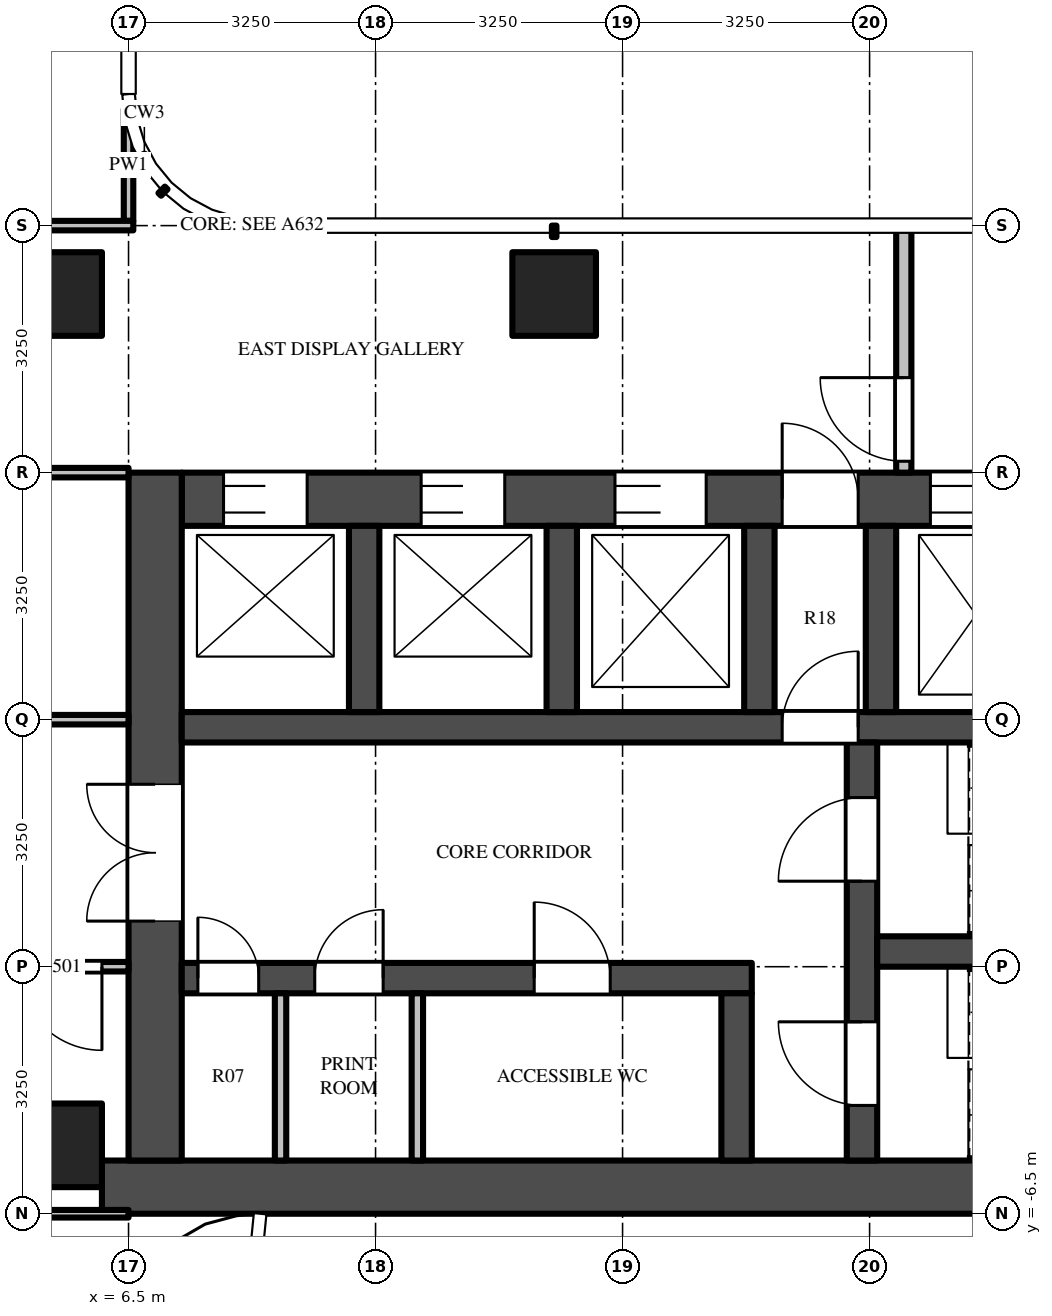
"""IFC4 building model, lengths in metres.
Left out: names, types, materials, properties, quantities, classifications, styles, units other than length and angle.
Written with IfcOpenShell. Run it as: python <this file> out.ifc"""

import sys

from ifc_helpers import new_model, si_unit, direction, frame, frame_2d, origin, origin_2d, place, context, subcontext, project, spatial, rectangle, extrude, source, transform, mapped, element, fill, save


model = new_model("IFC4")
c1 = context("Model", 3, precision=1e-05, world=origin(), true_north=direction((0.0, 1.0)))
c2 = subcontext(c1, "Body", "Model", "MODEL_VIEW")
j1 = project(units=[si_unit("LENGTHUNIT", "METRE"), si_unit("PLANEANGLEUNIT", "RADIAN")], contexts=[c1])
p1 = place(None, origin())
s1 = spatial("IfcSite", under=j1, at=p1, CompositionType="ELEMENT")
p2 = place(p1, origin())
s2 = spatial("IfcBuilding", under=s1, at=p2, CompositionType="ELEMENT")
p3 = place(p2, frame((0.0, 0.0, 251.9)))
s3 = spatial("IfcBuildingStorey", under=s2, at=p3, CompositionType="ELEMENT", Elevation=251.9)
m1 = source(origin(), c2, "Body", "SweptSolid", [
    extrude(rectangle(XDim=1.1, YDim=1.1, at=origin_2d()), origin(), (0.0, 0.0, 1.0), 3.9),
])
for number, where, z_axis, x_axis in (
    (1, (12.1, 5.6, 0.0), (0.0, 0.0, 1.0), (1.0, 0.0, 0.0)),
    (2, (5.6, 5.6, 0.0), (0.0, 0.0, 1.0), (1.0, 0.0, 0.0)),
    (3, (5.6, -5.6, 0.0), (0.0, 0.0, 1.0), (1.0, 0.0, 0.0)),
):
    element("IfcColumn", number, at=place(p3, frame(where, z_axis=z_axis, x_axis=x_axis)), inside=s3, PredefinedType="COLUMN", context=c2, shape_type="MappedRepresentation", body=[
        mapped(m1, transform((0.0, 0.0, 0.0))),
    ])
m2 = source(origin(), c2, "Body", "SweptSolid", [
    extrude(rectangle(XDim=16.6, YDim=0.7, at=frame_2d((8.3, 0.0))), origin(), (0.0, 0.0, 1.0), 3.7),
])
p4 = place(p3, frame((6.15, -6.15, 0.0), z_axis=(0.0, 0.0, 1.0), x_axis=(1.0, 0.0, 0.0)))
e4 = element("IfcWall", 4, at=p4, inside=s3, PredefinedType="SHEAR", context=c2, shape_type="MappedRepresentation", body=[
    mapped(m2, transform((0.0, 0.0, 0.0))),
])
m3 = source(origin(), c2, "Body", "SweptSolid", [
    extrude(rectangle(XDim=14.85, YDim=0.7, at=frame_2d((7.425, 0.0))), origin(), (0.0, 0.0, 1.0), 3.7),
])
p5 = place(p3, frame((7.2, 2.9, 0.0), z_axis=(0.0, 0.0, 1.0), x_axis=(1.0, 0.0, 0.0)))
e5 = element("IfcWall", 5, at=p5, inside=s3, PredefinedType="SHEAR", context=c2, shape_type="MappedRepresentation", body=[
    mapped(m3, transform((0.0, 0.0, 0.0))),
])
m4 = source(origin(), c2, "Body", "SweptSolid", [
    extrude(rectangle(XDim=1.1, YDim=2.1, at=frame_2d((0.55, 1.05))), frame((0.0, 0.36, 0.0), z_axis=(0.0, -1.0, 0.0), x_axis=(1.0, 0.0, 0.0)), (0.0, 0.0, 1.0), 0.72),
])
p6 = place(p5, frame((0.55, 0.0, 0.0)))
e6 = element("IfcOpeningElement", 6, at=p6, cuts=e5, PredefinedType="OPENING", context=c2, shape_type="MappedRepresentation", body=[
    mapped(m4, transform((0.0, 0.0, 0.0))),
])
p7 = place(p5, frame((3.15, 0.0, 0.0)))
e7 = element("IfcOpeningElement", 7, at=p7, cuts=e5, PredefinedType="OPENING", context=c2, shape_type="MappedRepresentation", body=[
    mapped(m4, transform((0.0, 0.0, 0.0))),
])
m5 = source(origin(), c2, "Body", "SweptSolid", [
    extrude(rectangle(XDim=1.2, YDim=2.1, at=frame_2d((0.6, 1.05))), frame((0.0, 0.36, 0.0), z_axis=(0.0, -1.0, 0.0), x_axis=(1.0, 0.0, 0.0)), (0.0, 0.0, 1.0), 0.72),
])
p8 = place(p5, frame((5.7, 0.0, 0.0)))
e8 = element("IfcOpeningElement", 8, at=p8, cuts=e5, PredefinedType="OPENING", context=c2, shape_type="MappedRepresentation", body=[
    mapped(m5, transform((0.0, 0.0, 0.0))),
])
m6 = source(origin(), c2, "Body", "SweptSolid", [
    extrude(rectangle(XDim=1.3, YDim=2.1, at=frame_2d((0.65, 1.05))), frame((0.0, 0.36, 0.0), z_axis=(0.0, -1.0, 0.0), x_axis=(1.0, 0.0, 0.0)), (0.0, 0.0, 1.0), 0.72),
])
p9 = place(p5, frame((12.2, 0.0, 0.0)))
e9 = element("IfcOpeningElement", 9, at=p9, cuts=e5, PredefinedType="OPENING", context=c2, shape_type="MappedRepresentation", body=[
    mapped(m6, transform((0.0, 0.0, 0.0))),
])
p10 = place(p5, frame((9.85, 0.0, 0.0)))
e10 = element("IfcOpeningElement", 10, at=p10, cuts=e5, PredefinedType="OPENING", context=c2, shape_type="MappedRepresentation", body=[
    mapped(m5, transform((0.0, 0.0, 0.0))),
])
m7 = source(origin(), c2, "Body", "SweptSolid", [
    extrude(rectangle(XDim=1.0, YDim=2.1, at=frame_2d((0.5, 1.05))), frame((0.0, 0.36, 0.0), z_axis=(0.0, -1.0, 0.0), x_axis=(1.0, 0.0, 0.0)), (0.0, 0.0, 1.0), 0.72),
])
p11 = place(p5, frame((7.9, 0.0, 0.0)))
e11 = element("IfcOpeningElement", 11, at=p11, cuts=e5, PredefinedType="OPENING", context=c2, shape_type="MappedRepresentation", body=[
    mapped(m7, transform((0.0, 0.0, 0.0))),
])
m8 = source(origin(), c2, "Body", "SweptSolid", [
    extrude(rectangle(XDim=9.05, YDim=0.7, at=frame_2d((4.525, 0.0))), origin(), (0.0, 0.0, 1.0), 3.7),
])
p12 = place(p3, frame((6.85, -5.8, 0.0), z_axis=(0.0, 0.0, 1.0), x_axis=(0.0, 1.0, 0.0)))
e12 = element("IfcWall", 12, at=p12, inside=s3, PredefinedType="SHEAR", context=c2, shape_type="MappedRepresentation", body=[
    mapped(m8, transform((0.0, 0.0, 0.0))),
])
m9 = source(origin(), c2, "Body", "SweptSolid", [
    extrude(rectangle(XDim=1.8, YDim=2.1, at=frame_2d((0.9, 1.05))), frame((0.0, 0.36, 0.0), z_axis=(0.0, -1.0, 0.0), x_axis=(1.0, 0.0, 0.0)), (0.0, 0.0, 1.0), 0.72),
])
p13 = place(p12, frame((3.15, 0.0, 0.0)))
e13 = element("IfcOpeningElement", 13, at=p13, cuts=e12, PredefinedType="OPENING", context=c2, shape_type="MappedRepresentation", body=[
    mapped(m9, transform((0.0, 0.0, 0.0))),
])
m10 = source(origin(), c2, "Body", "SweptSolid", [
    extrude(rectangle(XDim=7.5, YDim=0.4, at=frame_2d((3.75, 0.0))), origin(), (0.0, 0.0, 1.0), 3.7),
])
p14 = place(p3, frame((7.2, -3.4, 0.0), z_axis=(0.0, 0.0, 1.0), x_axis=(1.0, 0.0, 0.0)))
e14 = element("IfcWall", 14, at=p14, inside=s3, PredefinedType="SHEAR", context=c2, shape_type="MappedRepresentation", body=[
    mapped(m10, transform((0.0, 0.0, 0.0))),
])
m11 = source(origin(), c2, "Body", "SweptSolid", [
    extrude(rectangle(XDim=0.8, YDim=2.1, at=frame_2d((0.4, 1.05))), frame((0.0, 0.21, 0.0), z_axis=(0.0, -1.0, 0.0), x_axis=(1.0, 0.0, 0.0)), (0.0, 0.0, 1.0), 0.42),
])
p15 = place(p14, frame((0.212, 0.0, 0.0)))
e15 = element("IfcOpeningElement", 15, at=p15, cuts=e14, PredefinedType="OPENING", context=c2, shape_type="MappedRepresentation", body=[
    mapped(m11, transform((0.0, 0.0, 0.0))),
])
m12 = source(origin(), c2, "Body", "SweptSolid", [
    extrude(rectangle(XDim=0.9, YDim=2.1, at=frame_2d((0.45, 1.05))), frame((0.0, 0.21, 0.0), z_axis=(0.0, -1.0, 0.0), x_axis=(1.0, 0.0, 0.0)), (0.0, 0.0, 1.0), 0.42),
])
p16 = place(p14, frame((1.75, 0.0, 0.0)))
e16 = element("IfcOpeningElement", 16, at=p16, cuts=e14, PredefinedType="OPENING", context=c2, shape_type="MappedRepresentation", body=[
    mapped(m12, transform((0.0, 0.0, 0.0))),
])
m13 = source(origin(), c2, "Body", "SweptSolid", [
    extrude(rectangle(XDim=1.0, YDim=2.1, at=frame_2d((0.5, 1.05))), frame((0.0, 0.21, 0.0), z_axis=(0.0, -1.0, 0.0), x_axis=(1.0, 0.0, 0.0)), (0.0, 0.0, 1.0), 0.42),
])
p17 = place(p14, frame((4.637, 0.0, 0.0)))
e17 = element("IfcOpeningElement", 17, at=p17, cuts=e14, PredefinedType="OPENING", context=c2, shape_type="MappedRepresentation", body=[
    mapped(m13, transform((0.0, 0.0, 0.0))),
])
m14 = source(origin(), c2, "Body", "SweptSolid", [
    extrude(rectangle(XDim=14.85, YDim=0.4, at=frame_2d((7.425, 0.0))), origin(), (0.0, 0.0, 1.0), 3.7),
])
p18 = place(p3, frame((7.2, -0.1, 0.0), z_axis=(0.0, 0.0, 1.0), x_axis=(1.0, 0.0, 0.0)))
e18 = element("IfcWall", 18, at=p18, inside=s3, PredefinedType="SHEAR", context=c2, shape_type="MappedRepresentation", body=[
    mapped(m14, transform((0.0, 0.0, 0.0))),
])
p19 = place(p18, frame((7.9, 0.0, 0.0)))
e19 = element("IfcOpeningElement", 19, at=p19, cuts=e18, PredefinedType="OPENING", context=c2, shape_type="MappedRepresentation", body=[
    mapped(m13, transform((0.0, 0.0, 0.0))),
])
m15 = source(origin(), c2, "Body", "SweptSolid", [
    extrude(rectangle(XDim=5.5, YDim=0.4, at=frame_2d((2.75, 0.0))), origin(), (0.0, 0.0, 1.0), 3.7),
])
p20 = place(p3, frame((16.15, -5.8, 0.0), z_axis=(0.0, 0.0, 1.0), x_axis=(0.0, 1.0, 0.0)))
e20 = element("IfcWall", 20, at=p20, inside=s3, PredefinedType="SHEAR", context=c2, shape_type="MappedRepresentation", body=[
    mapped(m15, transform((0.0, 0.0, 0.0))),
])
m16 = source(origin(), c2, "Body", "SweptSolid", [
    extrude(rectangle(XDim=1.1, YDim=2.1, at=frame_2d((0.55, 1.05))), frame((0.0, 0.21, 0.0), z_axis=(0.0, -1.0, 0.0), x_axis=(1.0, 0.0, 0.0)), (0.0, 0.0, 1.0), 0.42),
])
p21 = place(p20, frame((0.725, 0.0, 0.0)))
e21 = element("IfcOpeningElement", 21, at=p21, cuts=e20, PredefinedType="OPENING", context=c2, shape_type="MappedRepresentation", body=[
    mapped(m16, transform((0.0, 0.0, 0.0))),
])
p22 = place(p20, frame((3.675, 0.0, 0.0)))
e22 = element("IfcOpeningElement", 22, at=p22, cuts=e20, PredefinedType="OPENING", context=c2, shape_type="MappedRepresentation", body=[
    mapped(m16, transform((0.0, 0.0, 0.0))),
])
m17 = source(origin(), c2, "Body", "SweptSolid", [
    extrude(rectangle(XDim=5.7, YDim=0.4, at=frame_2d((2.85, 0.0))), origin(), (0.0, 0.0, 1.0), 3.7),
])
p23 = place(p3, frame((16.35, -3.05, 0.0), z_axis=(0.0, 0.0, 1.0), x_axis=(1.0, 0.0, 0.0)))
e23 = element("IfcWall", 23, at=p23, inside=s3, PredefinedType="SHEAR", context=c2, shape_type="MappedRepresentation", body=[
    mapped(m17, transform((0.0, 0.0, 0.0))),
])
m18 = source(origin(), c2, "Body", "SweptSolid", [
    extrude(rectangle(XDim=2.2, YDim=0.4, at=frame_2d((1.1, 0.0))), origin(), (0.0, 0.0, 1.0), 3.7),
])
p24 = place(p3, frame((14.5, -5.8, 0.0), z_axis=(0.0, 0.0, 1.0), x_axis=(0.0, 1.0, 0.0)))
e24 = element("IfcWall", 24, at=p24, inside=s3, PredefinedType="SHEAR", context=c2, shape_type="MappedRepresentation", body=[
    mapped(m18, transform((0.0, 0.0, 0.0))),
])
m19 = source(origin(), c2, "Body", "SweptSolid", [
    extrude(rectangle(XDim=2.45, YDim=0.4, at=frame_2d((1.225, 0.0))), origin(), (0.0, 0.0, 1.0), 3.7),
])
for number, where, z_axis, x_axis in (
    (25, (9.6, 0.1, 0.0), (0.0, 0.0, 1.0), (0.0, 1.0, 0.0)),
    (26, (12.2, 0.1, 0.0), (0.0, 0.0, 1.0), (0.0, 1.0, 0.0)),
    (27, (14.8, 0.1, 0.0), (0.0, 0.0, 1.0), (0.0, 1.0, 0.0)),
    (28, (16.4, 0.1, 0.0), (0.0, 0.0, 1.0), (0.0, 1.0, 0.0)),
):
    element("IfcWall", number, at=place(p3, frame(where, z_axis=z_axis, x_axis=x_axis)), inside=s3, PredefinedType="SHEAR", context=c2, shape_type="MappedRepresentation", body=[
        mapped(m19, transform((0.0, 0.0, 0.0))),
    ])
m20 = source(origin(), c2, "Body", "SweptSolid", [
    extrude(rectangle(XDim=3.25, YDim=0.2, at=frame_2d((1.625, 0.0))), origin(), (0.0, 0.0, 1.0), 3.7),
])
p25 = place(p3, frame((16.7, 3.25, 0.0), z_axis=(0.0, 0.0, 1.0), x_axis=(0.0, 1.0, 0.0)))
e29 = element("IfcWall", 29, at=p25, inside=s3, PredefinedType="PARTITIONING", context=c2, shape_type="MappedRepresentation", body=[
    mapped(m20, transform((0.0, 0.0, 0.0))),
])
m21 = source(origin(), c2, "Body", "SweptSolid", [
    extrude(rectangle(XDim=1.1, YDim=2.1, at=frame_2d((0.55, 1.05))), frame((0.0, 0.11, 0.0), z_axis=(0.0, -1.0, 0.0), x_axis=(1.0, 0.0, 0.0)), (0.0, 0.0, 1.0), 0.22),
])
p26 = place(p25, frame((0.15, 0.0, 0.0)))
e30 = element("IfcOpeningElement", 30, at=p26, cuts=e29, PredefinedType="OPENING", context=c2, shape_type="MappedRepresentation", body=[
    mapped(m21, transform((0.0, 0.0, 0.0))),
])
m22 = source(origin(), c2, "Body", "SweptSolid", [
    extrude(rectangle(XDim=2.2, YDim=0.15, at=frame_2d((1.1, 0.0))), origin(), (0.0, 0.0, 1.0), 3.7),
])
for number, where, z_axis, x_axis in (
    (31, (8.5, -5.8, 0.0), (0.0, 0.0, 1.0), (0.0, 1.0, 0.0)),
    (32, (10.3, -5.8, 0.0), (0.0, 0.0, 1.0), (0.0, 1.0, 0.0)),
):
    element("IfcWall", number, at=place(p3, frame(where, z_axis=z_axis, x_axis=x_axis)), inside=s3, PredefinedType="PARTITIONING", context=c2, shape_type="MappedRepresentation", body=[
        mapped(m22, transform((0.0, 0.0, 0.0))),
    ])
m23 = source(origin(), c2, "Body", "SweptSolid", [
    extrude(rectangle(XDim=1.469, YDim=0.125, at=frame_2d((0.734, 0.0))), origin(), (0.0, 0.0, 1.0), 3.7),
])
p27 = place(p3, frame((6.5, 6.562, 0.0), z_axis=(0.0, 0.0, 1.0), x_axis=(0.0, 1.0, 0.0)))
e33 = element("IfcWall", 33, at=p27, inside=s3, PredefinedType="PARTITIONING", context=c2, shape_type="MappedRepresentation", body=[
    mapped(m23, transform((0.0, 0.0, 0.0))),
])
m24 = source(origin(), c2, "Body", "SweptSolid", [
    extrude(rectangle(XDim=5.238, YDim=0.1, at=frame_2d((2.619, 0.0))), origin(), (0.0, 0.0, 1.0), 2.78),
])
p28 = place(p3, frame((1.262, -6.5, 0.0), z_axis=(0.0, 0.0, 1.0), x_axis=(1.0, 0.0, 0.0)))
e34 = element("IfcWall", 34, at=p28, inside=s3, PredefinedType="PARTITIONING", context=c2, shape_type="MappedRepresentation", body=[
    mapped(m24, transform((0.0, 0.0, 0.0))),
])
m25 = source(origin(), c2, "Body", "SweptSolid", [
    extrude(rectangle(XDim=5.363, YDim=0.125, at=frame_2d((2.681, 0.0))), origin(), (0.0, 0.0, 1.0), 2.997),
])
p29 = place(p3, frame((6.5, -3.25, 0.0), z_axis=(0.0, 0.0, 1.0), x_axis=(-1.0, 0.0, 0.0)))
e35 = element("IfcWall", 35, at=p29, inside=s3, PredefinedType="PARTITIONING", context=c2, shape_type="MappedRepresentation", body=[
    mapped(m25, transform((0.0, 0.0, 0.0))),
])
m26 = source(origin(), c2, "Body", "SweptSolid", [
    extrude(rectangle(XDim=1.1, YDim=2.1, at=frame_2d((0.55, 1.05))), frame((0.0, 0.073, 0.0), z_axis=(0.0, -1.0, 0.0), x_axis=(1.0, 0.0, 0.0)), (0.0, 0.0, 1.0), 0.145),
])
p30 = place(p29, frame((0.35, 0.0, 0.0)))
e36 = element("IfcOpeningElement", 36, at=p30, cuts=e35, PredefinedType="OPENING", context=c2, shape_type="MappedRepresentation", body=[
    mapped(m26, transform((0.0, 0.0, 0.0))),
])
p31 = place(p3, frame((6.5, 0.0, 0.0), z_axis=(0.0, 0.0, 1.0), x_axis=(-1.0, 0.0, 0.0)))
e37 = element("IfcWall", 37, at=p31, inside=s3, PredefinedType="PARTITIONING", context=c2, shape_type="MappedRepresentation", body=[
    mapped(m25, transform((0.0, 0.0, 0.0))),
])
m27 = source(origin(), c2, "Body", "SweptSolid", [
    extrude(rectangle(XDim=1.0, YDim=2.1, at=frame_2d((0.5, 1.05))), frame((0.0, 0.073, 0.0), z_axis=(0.0, -1.0, 0.0), x_axis=(1.0, 0.0, 0.0)), (0.0, 0.0, 1.0), 0.145),
])
p32 = place(p31, frame((3.95, 0.0, 0.0)))
e38 = element("IfcOpeningElement", 38, at=p32, cuts=e37, PredefinedType="OPENING", context=c2, shape_type="MappedRepresentation", body=[
    mapped(m27, transform((0.0, 0.0, 0.0))),
])
p33 = place(p3, frame((1.137, 3.25, 0.0), z_axis=(0.0, 0.0, 1.0), x_axis=(1.0, 0.0, 0.0)))
e39 = element("IfcWall", 39, at=p33, inside=s3, PredefinedType="PARTITIONING", context=c2, shape_type="MappedRepresentation", body=[
    mapped(m25, transform((0.0, 0.0, 0.0))),
])
m28 = source(origin(), c2, "Body", "SweptSolid", [
    extrude(rectangle(XDim=5.425, YDim=0.125, at=frame_2d((2.712, 0.0))), origin(), (0.0, 0.0, 1.0), 2.78),
])
p34 = place(p3, frame((1.137, 6.5, 0.0), z_axis=(0.0, 0.0, 1.0), x_axis=(1.0, 0.0, 0.0)))
e40 = element("IfcWall", 40, at=p34, inside=s3, PredefinedType="PARTITIONING", context=c2, shape_type="MappedRepresentation", body=[
    mapped(m28, transform((0.0, 0.0, 0.0))),
])
p35 = place(p34, frame((0.413, 0.0, 0.0)))
e41 = element("IfcOpeningElement", 41, at=p35, cuts=e40, PredefinedType="OPENING", context=c2, shape_type="MappedRepresentation", body=[
    mapped(m27, transform((0.0, 0.0, 0.0))),
])
m29 = source(origin(), c2, "Body", "SweptSolid", [
    extrude(rectangle(XDim=1.1, YDim=2.1, at=frame_2d((0.55, 1.05))), frame((0.0, -0.275, 0.0), z_axis=(0.0, -1.0, 0.0), x_axis=(1.0, 0.0, 0.0)), (0.0, 0.0, 1.0), 0.05),
])
p36 = place(p6, origin())
e42 = element("IfcDoor", 42, at=p36, inside=s3, OperationType="DOUBLE_DOOR_SLIDING", PredefinedType="DOOR", context=c2, shape_type="MappedRepresentation", body=[
    mapped(m29, transform((0.0, 0.0, 0.0))),
])
fill(e6, e42)
p37 = place(p7, origin())
e43 = element("IfcDoor", 43, at=p37, inside=s3, OperationType="DOUBLE_DOOR_SLIDING", PredefinedType="DOOR", context=c2, shape_type="MappedRepresentation", body=[
    mapped(m29, transform((0.0, 0.0, 0.0))),
])
fill(e7, e43)
m30 = source(origin(), c2, "Body", "SweptSolid", [
    extrude(rectangle(XDim=1.2, YDim=2.1, at=frame_2d((0.6, 1.05))), frame((0.0, -0.275, 0.0), z_axis=(0.0, -1.0, 0.0), x_axis=(1.0, 0.0, 0.0)), (0.0, 0.0, 1.0), 0.05),
])
p38 = place(p8, origin())
e44 = element("IfcDoor", 44, at=p38, inside=s3, OperationType="DOUBLE_DOOR_SLIDING", PredefinedType="DOOR", context=c2, shape_type="MappedRepresentation", body=[
    mapped(m30, transform((0.0, 0.0, 0.0))),
])
fill(e8, e44)
p39 = place(p10, origin())
e45 = element("IfcDoor", 45, at=p39, inside=s3, OperationType="DOUBLE_DOOR_SLIDING", PredefinedType="DOOR", context=c2, shape_type="MappedRepresentation", body=[
    mapped(m30, transform((0.0, 0.0, 0.0))),
])
fill(e10, e45)
m31 = source(origin(), c2, "Body", "SweptSolid", [
    extrude(rectangle(XDim=1.8, YDim=2.1, at=frame_2d((0.9, 1.05))), frame((0.0, -0.275, 0.0), z_axis=(0.0, -1.0, 0.0), x_axis=(1.0, 0.0, 0.0)), (0.0, 0.0, 1.0), 0.05),
])
p40 = place(p13, origin())
e46 = element("IfcDoor", 46, at=p40, inside=s3, OperationType="DOUBLE_DOOR_SINGLE_SWING", PredefinedType="DOOR", context=c2, shape_type="MappedRepresentation", body=[
    mapped(m31, transform((0.0, 0.0, 0.0))),
])
fill(e13, e46)
m32 = source(origin(), c2, "Body", "SweptSolid", [
    extrude(rectangle(XDim=1.1, YDim=2.1, at=frame_2d((0.55, 1.05))), frame((0.0, 0.025, 0.0), z_axis=(0.0, -1.0, 0.0), x_axis=(1.0, 0.0, 0.0)), (0.0, 0.0, 1.0), 0.05),
])
p41 = place(p21, origin())
e47 = element("IfcDoor", 47, at=p41, inside=s3, OperationType="SINGLE_SWING_RIGHT", PredefinedType="DOOR", context=c2, shape_type="MappedRepresentation", body=[
    mapped(m32, transform((0.0, 0.0, 0.0))),
])
fill(e21, e47)
p42 = place(p22, origin())
e48 = element("IfcDoor", 48, at=p42, inside=s3, OperationType="SINGLE_SWING_LEFT", PredefinedType="DOOR", context=c2, shape_type="MappedRepresentation", body=[
    mapped(m32, transform((0.0, 0.0, 0.0))),
])
fill(e22, e48)
m33 = source(origin(), c2, "Body", "SweptSolid", [
    extrude(rectangle(XDim=1.0, YDim=2.1, at=frame_2d((0.5, 1.05))), frame((0.0, 0.025, 0.0), z_axis=(0.0, -1.0, 0.0), x_axis=(1.0, 0.0, 0.0)), (0.0, 0.0, 1.0), 0.05),
])
p43 = place(p19, origin())
e49 = element("IfcDoor", 49, at=p43, inside=s3, OperationType="SINGLE_SWING_RIGHT", PredefinedType="DOOR", context=c2, shape_type="MappedRepresentation", body=[
    mapped(m33, transform((0.0, 0.0, 0.0))),
])
fill(e19, e49)
m34 = source(origin(), c2, "Body", "SweptSolid", [
    extrude(rectangle(XDim=1.0, YDim=2.1, at=frame_2d((0.5, 1.05))), frame((0.0, -0.275, 0.0), z_axis=(0.0, -1.0, 0.0), x_axis=(1.0, 0.0, 0.0)), (0.0, 0.0, 1.0), 0.05),
])
p44 = place(p11, origin())
e50 = element("IfcDoor", 50, at=p44, inside=s3, OperationType="SINGLE_SWING_LEFT", PredefinedType="DOOR", context=c2, shape_type="MappedRepresentation", body=[
    mapped(m34, transform((0.0, 0.0, 0.0))),
])
fill(e11, e50)
p45 = place(p26, origin())
e51 = element("IfcDoor", 51, at=p45, inside=s3, OperationType="SINGLE_SWING_RIGHT", PredefinedType="DOOR", context=c2, shape_type="MappedRepresentation", body=[
    mapped(m32, transform((0.0, 0.0, 0.0))),
])
fill(e30, e51)
m35 = source(origin(), c2, "Body", "SweptSolid", [
    extrude(rectangle(XDim=0.8, YDim=2.1, at=frame_2d((0.4, 1.05))), frame((0.0, 0.025, 0.0), z_axis=(0.0, -1.0, 0.0), x_axis=(1.0, 0.0, 0.0)), (0.0, 0.0, 1.0), 0.05),
])
p46 = place(p15, origin())
e52 = element("IfcDoor", 52, at=p46, inside=s3, OperationType="SINGLE_SWING_LEFT", PredefinedType="DOOR", context=c2, shape_type="MappedRepresentation", body=[
    mapped(m35, transform((0.0, 0.0, 0.0))),
])
fill(e15, e52)
m36 = source(origin(), c2, "Body", "SweptSolid", [
    extrude(rectangle(XDim=0.9, YDim=2.1, at=frame_2d((0.45, 1.05))), frame((0.0, 0.025, 0.0), z_axis=(0.0, -1.0, 0.0), x_axis=(1.0, 0.0, 0.0)), (0.0, 0.0, 1.0), 0.05),
])
p47 = place(p16, origin())
e53 = element("IfcDoor", 53, at=p47, inside=s3, OperationType="SINGLE_SWING_RIGHT", PredefinedType="DOOR", context=c2, shape_type="MappedRepresentation", body=[
    mapped(m36, transform((0.0, 0.0, 0.0))),
])
fill(e16, e53)
p48 = place(p17, origin())
e54 = element("IfcDoor", 54, at=p48, inside=s3, OperationType="SINGLE_SWING_LEFT", PredefinedType="DOOR", context=c2, shape_type="MappedRepresentation", body=[
    mapped(m33, transform((0.0, 0.0, 0.0))),
])
fill(e17, e54)
p49 = place(p30, origin())
e55 = element("IfcDoor", 55, at=p49, inside=s3, OperationType="SINGLE_SWING_LEFT", PredefinedType="DOOR", context=c2, shape_type="MappedRepresentation", body=[
    mapped(m32, transform((0.0, 0.0, 0.0))),
])
fill(e36, e55)
save(model, sys.argv[1])
